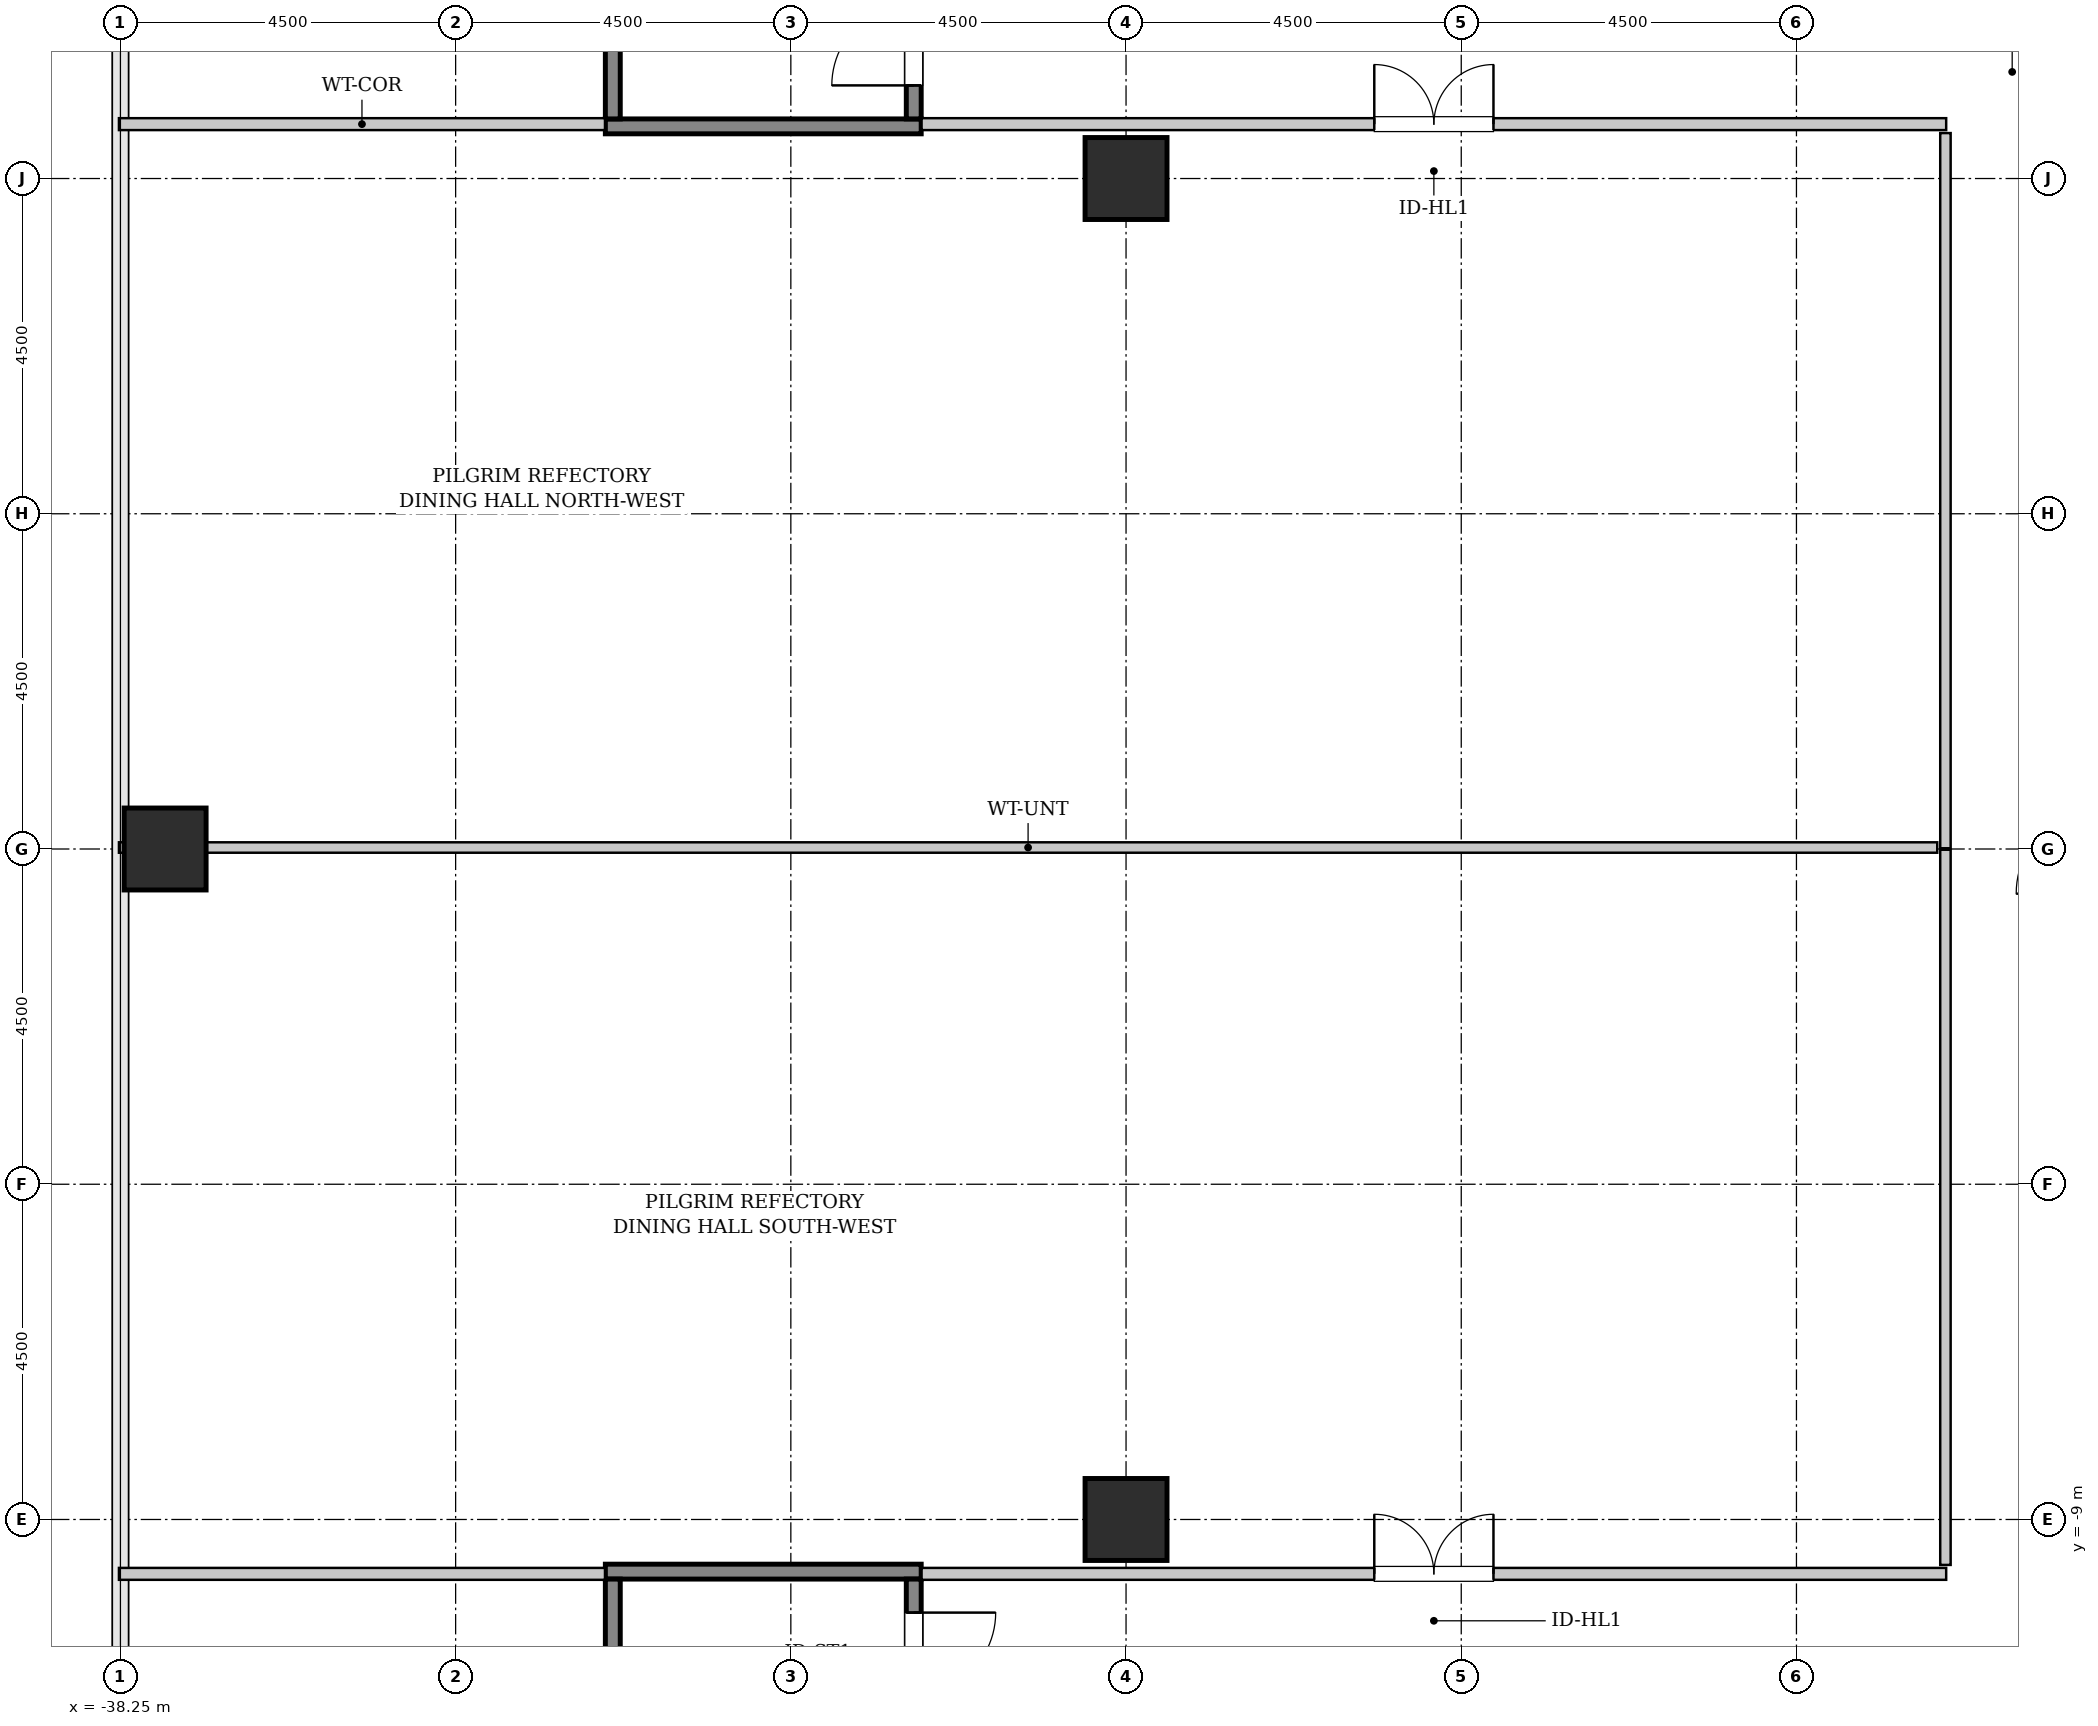
"""IFC4 building model, lengths in metres.
Left out: names, types, materials, properties, quantities, classifications, styles, units other than length and angle.
Written with IfcOpenShell. Run it as: python <this file> out.ifc"""

import sys

from ifc_helpers import new_model, si_unit, direction, frame, frame_2d, origin, origin_2d, place, context, subcontext, project, spatial, rectangle, hollow_rectangle, extrude, source, transform, mapped, element, fill, save


model = new_model("IFC4")
c1 = context("Model", 3, precision=1e-05, world=origin(), true_north=direction((0.0, 1.0)))
c2 = subcontext(c1, "Body", "Model", "MODEL_VIEW")
j1 = project(units=[si_unit("LENGTHUNIT", "METRE"), si_unit("PLANEANGLEUNIT", "RADIAN")], contexts=[c1])
p1 = place(None, origin())
s1 = spatial("IfcSite", under=j1, at=p1, CompositionType="ELEMENT")
p2 = place(p1, origin())
s2 = spatial("IfcBuilding", under=s1, at=p2, CompositionType="ELEMENT")
p3 = place(p2, frame((0.0, 0.0, 16.8)))
s3 = spatial("IfcBuildingStorey", under=s2, at=p3, CompositionType="ELEMENT", Elevation=16.8)
m1 = source(origin(), c2, "Body", "SweptSolid", [
    extrude(hollow_rectangle(XDim=1.1, YDim=1.1, WallThickness=0.055, InnerFilletRadius=0.055, OuterFilletRadius=0.11, at=origin_2d()), origin(), (0.0, 0.0, 1.0), 5.4),
])
p4 = place(p3, frame((-37.65, 0.0, 0.0), z_axis=(0.0, 0.0, 1.0), x_axis=(1.0, 0.0, 0.0)))
e1 = element("IfcColumn", 1, at=p4, inside=s3, PredefinedType="COLUMN", context=c2, shape_type="MappedRepresentation", body=[
    mapped(m1, transform((0.0, 0.0, 0.0), x_axis=(1.0, 0.0, 0.0), y_axis=(0.0, 1.0, 0.0), z_axis=(0.0, 0.0, 1.0), scale=1.0)),
])
m2 = source(origin(), c2, "Body", "SweptSolid", [
    extrude(hollow_rectangle(XDim=1.1, YDim=1.1, WallThickness=0.055, InnerFilletRadius=0.055, OuterFilletRadius=0.11, at=origin_2d()), origin(), (0.0, 0.0, 1.0), 5.4),
])
for number, where, z_axis, x_axis in (
    (2, (-24.75, -9.0, 0.0), (0.0, 0.0, 1.0), (1.0, 0.0, 0.0)),
    (3, (-24.75, 9.0, 0.0), (0.0, 0.0, 1.0), (1.0, 0.0, 0.0)),
):
    element("IfcColumn", number, at=place(p3, frame(where, z_axis=z_axis, x_axis=x_axis)), inside=s3, PredefinedType="COLUMN", context=c2, shape_type="MappedRepresentation", body=[
        mapped(m2, transform((0.0, 0.0, 0.0), x_axis=(1.0, 0.0, 0.0), y_axis=(0.0, 1.0, 0.0), z_axis=(0.0, 0.0, 1.0), scale=1.0)),
    ])
m3 = source(origin(), c2, "Body", "SweptSolid", [
    extrude(rectangle(XDim=4.24, YDim=0.2, at=frame_2d((2.12, 0.0))), origin(), (0.0, 0.0, 1.0), 5.4),
])
p5 = place(p3, frame((-27.5, 9.7, 0.0), z_axis=(0.0, 0.0, 1.0), x_axis=(-1.0, 0.0, 0.0)))
e4 = element("IfcWall", 4, at=p5, inside=s3, PredefinedType="SOLIDWALL", context=c2, shape_type="MappedRepresentation", body=[
    mapped(m3, transform((0.0, 0.0, 0.0), x_axis=(1.0, 0.0, 0.0), y_axis=(0.0, 1.0, 0.0), z_axis=(0.0, 0.0, 1.0), scale=1.0)),
])
m4 = source(origin(), c2, "Body", "SweptSolid", [
    extrude(rectangle(XDim=9.0, YDim=0.2, at=frame_2d((4.5, 0.0))), origin(), (0.0, 0.0, 1.0), 5.4),
])
p6 = place(p3, frame((-27.6, 9.8, 0.0), z_axis=(0.0, 0.0, 1.0), x_axis=(0.0, 1.0, 0.0)))
e5 = element("IfcWall", 5, at=p6, inside=s3, PredefinedType="SOLIDWALL", context=c2, shape_type="MappedRepresentation", body=[
    mapped(m4, transform((0.0, 0.0, 0.0), x_axis=(1.0, 0.0, 0.0), y_axis=(0.0, 1.0, 0.0), z_axis=(0.0, 0.0, 1.0), scale=1.0)),
])
p7 = place(p6, frame((0.45, 0.0, 0.0)))
e6 = element("IfcOpeningElement", 6, at=p7, cuts=e5, PredefinedType="OPENING", context=c2, shape_type="SweptSolid", body=[
    extrude(rectangle(XDim=1.1, YDim=2.15, at=frame_2d((0.55, 1.075))), frame((0.0, 0.11, 0.0), z_axis=(0.0, -1.0, 0.0), x_axis=(1.0, 0.0, 0.0)), (0.0, 0.0, 1.0), 0.22),
])
p8 = place(p3, frame((-31.64, 9.8, 0.0), z_axis=(0.0, 0.0, 1.0), x_axis=(0.0, 1.0, 0.0)))
e7 = element("IfcWall", 7, at=p8, inside=s3, PredefinedType="SOLIDWALL", context=c2, shape_type="MappedRepresentation", body=[
    mapped(m4, transform((0.0, 0.0, 0.0), x_axis=(1.0, 0.0, 0.0), y_axis=(0.0, 1.0, 0.0), z_axis=(0.0, 0.0, 1.0), scale=1.0)),
])
p9 = place(p3, frame((-31.74, -9.7, 0.0), z_axis=(0.0, 0.0, 1.0), x_axis=(1.0, 0.0, 0.0)))
e8 = element("IfcWall", 8, at=p9, inside=s3, PredefinedType="SOLIDWALL", context=c2, shape_type="MappedRepresentation", body=[
    mapped(m3, transform((0.0, 0.0, 0.0), x_axis=(1.0, 0.0, 0.0), y_axis=(0.0, 1.0, 0.0), z_axis=(0.0, 0.0, 1.0), scale=1.0)),
])
p10 = place(p3, frame((-31.64, -9.8, 0.0), z_axis=(0.0, 0.0, 1.0), x_axis=(0.0, -1.0, 0.0)))
e9 = element("IfcWall", 9, at=p10, inside=s3, PredefinedType="SOLIDWALL", context=c2, shape_type="MappedRepresentation", body=[
    mapped(m4, transform((0.0, 0.0, 0.0), x_axis=(1.0, 0.0, 0.0), y_axis=(0.0, 1.0, 0.0), z_axis=(0.0, 0.0, 1.0), scale=1.0)),
])
p11 = place(p3, frame((-27.6, -9.8, 0.0), z_axis=(0.0, 0.0, 1.0), x_axis=(0.0, -1.0, 0.0)))
e10 = element("IfcWall", 10, at=p11, inside=s3, PredefinedType="SOLIDWALL", context=c2, shape_type="MappedRepresentation", body=[
    mapped(m4, transform((0.0, 0.0, 0.0), x_axis=(1.0, 0.0, 0.0), y_axis=(0.0, 1.0, 0.0), z_axis=(0.0, 0.0, 1.0), scale=1.0)),
])
p12 = place(p11, frame((0.45, 0.0, 0.0)))
e11 = element("IfcOpeningElement", 11, at=p12, cuts=e10, PredefinedType="OPENING", context=c2, shape_type="SweptSolid", body=[
    extrude(rectangle(XDim=1.1, YDim=2.15, at=frame_2d((0.55, 1.075))), frame((0.0, 0.11, 0.0), z_axis=(0.0, -1.0, 0.0), x_axis=(1.0, 0.0, 0.0)), (0.0, 0.0, 1.0), 0.22),
])
m5 = source(origin(), c2, "Body", "SweptSolid", [
    extrude(rectangle(XDim=13.755, YDim=0.16, at=frame_2d((6.877, 0.0))), origin(), (0.0, 0.0, 1.0), 5.085),
])
p13 = place(p3, frame((-27.495, 9.73, 0.0), z_axis=(0.0, 0.0, 1.0), x_axis=(1.0, 0.0, 0.0)))
e12 = element("IfcWall", 12, at=p13, inside=s3, PredefinedType="PARTITIONING", context=c2, shape_type="MappedRepresentation", body=[
    mapped(m5, transform((0.0, 0.0, 0.0), x_axis=(1.0, 0.0, 0.0), y_axis=(0.0, 1.0, 0.0), z_axis=(0.0, 0.0, 1.0), scale=1.0)),
])
p14 = place(p13, frame((6.077, 0.0, 0.0)))
e13 = element("IfcOpeningElement", 13, at=p14, cuts=e12, PredefinedType="OPENING", context=c2, shape_type="SweptSolid", body=[
    extrude(rectangle(XDim=1.6, YDim=2.3, at=frame_2d((0.8, 1.15))), frame((0.0, 0.09, 0.0), z_axis=(0.0, -1.0, 0.0), x_axis=(1.0, 0.0, 0.0)), (0.0, 0.0, 1.0), 0.18),
])
m6 = source(origin(), c2, "Body", "SweptSolid", [
    extrude(rectangle(XDim=6.525, YDim=0.16, at=frame_2d((3.262, 0.0))), origin(), (0.0, 0.0, 1.0), 5.085),
])
p15 = place(p3, frame((-38.27, 9.73, 0.0), z_axis=(0.0, 0.0, 1.0), x_axis=(1.0, 0.0, 0.0)))
e14 = element("IfcWall", 14, at=p15, inside=s3, PredefinedType="PARTITIONING", context=c2, shape_type="MappedRepresentation", body=[
    mapped(m6, transform((0.0, 0.0, 0.0), x_axis=(1.0, 0.0, 0.0), y_axis=(0.0, 1.0, 0.0), z_axis=(0.0, 0.0, 1.0), scale=1.0)),
])
m7 = source(origin(), c2, "Body", "SweptSolid", [
    extrude(rectangle(XDim=9.6, YDim=0.14, at=frame_2d((4.8, 0.0))), origin(), (0.0, 0.0, 1.0), 5.085),
])
p16 = place(p3, frame((-13.75, 0.01, 0.0), z_axis=(0.0, 0.0, 1.0), x_axis=(0.0, 1.0, 0.0)))
e15 = element("IfcWall", 15, at=p16, inside=s3, PredefinedType="PARTITIONING", context=c2, shape_type="MappedRepresentation", body=[
    mapped(m7, transform((0.0, 0.0, 0.0), x_axis=(1.0, 0.0, 0.0), y_axis=(0.0, 1.0, 0.0), z_axis=(0.0, 0.0, 1.0), scale=1.0)),
])
m8 = source(origin(), c2, "Body", "SweptSolid", [
    extrude(rectangle(XDim=24.41, YDim=0.14, at=frame_2d((12.205, 0.0))), origin(), (0.0, 0.0, 1.0), 5.085),
])
p17 = place(p3, frame((-38.27, 0.02, 0.0), z_axis=(0.0, 0.0, 1.0), x_axis=(1.0, 0.0, 0.0)))
e16 = element("IfcWall", 16, at=p17, inside=s3, PredefinedType="PARTITIONING", context=c2, shape_type="MappedRepresentation", body=[
    mapped(m8, transform((0.0, 0.0, 0.0), x_axis=(1.0, 0.0, 0.0), y_axis=(0.0, 1.0, 0.0), z_axis=(0.0, 0.0, 1.0), scale=1.0)),
])
p18 = place(p3, frame((-38.27, -9.73, 0.0), z_axis=(0.0, 0.0, 1.0), x_axis=(1.0, 0.0, 0.0)))
e17 = element("IfcWall", 17, at=p18, inside=s3, PredefinedType="PARTITIONING", context=c2, shape_type="MappedRepresentation", body=[
    mapped(m6, transform((0.0, 0.0, 0.0), x_axis=(1.0, 0.0, 0.0), y_axis=(0.0, 1.0, 0.0), z_axis=(0.0, 0.0, 1.0), scale=1.0)),
])
p19 = place(p3, frame((-27.495, -9.73, 0.0), z_axis=(0.0, 0.0, 1.0), x_axis=(1.0, 0.0, 0.0)))
e18 = element("IfcWall", 18, at=p19, inside=s3, PredefinedType="PARTITIONING", context=c2, shape_type="MappedRepresentation", body=[
    mapped(m5, transform((0.0, 0.0, 0.0), x_axis=(1.0, 0.0, 0.0), y_axis=(0.0, 1.0, 0.0), z_axis=(0.0, 0.0, 1.0), scale=1.0)),
])
p20 = place(p19, frame((6.077, 0.0, 0.0)))
e19 = element("IfcOpeningElement", 19, at=p20, cuts=e18, PredefinedType="OPENING", context=c2, shape_type="SweptSolid", body=[
    extrude(rectangle(XDim=1.6, YDim=2.3, at=frame_2d((0.8, 1.15))), frame((0.0, 0.09, 0.0), z_axis=(0.0, -1.0, 0.0), x_axis=(1.0, 0.0, 0.0)), (0.0, 0.0, 1.0), 0.18),
])
p21 = place(p3, frame((-13.75, -9.61, 0.0), z_axis=(0.0, 0.0, 1.0), x_axis=(0.0, 1.0, 0.0)))
e20 = element("IfcWall", 20, at=p21, inside=s3, PredefinedType="PARTITIONING", context=c2, shape_type="MappedRepresentation", body=[
    mapped(m7, transform((0.0, 0.0, 0.0), x_axis=(1.0, 0.0, 0.0), y_axis=(0.0, 1.0, 0.0), z_axis=(0.0, 0.0, 1.0), scale=1.0)),
])
m9 = source(origin(), c2, "Body", "SweptSolid", [
    extrude(rectangle(XDim=1.1, YDim=2.15, at=frame_2d((0.55, 1.075))), frame((0.0, 0.025, 0.0), z_axis=(0.0, -1.0, 0.0), x_axis=(1.0, 0.0, 0.0)), (0.0, 0.0, 1.0), 0.05),
])
p22 = place(p7, origin())
e21 = element("IfcDoor", 21, at=p22, inside=s3, OperationType="SINGLE_SWING_LEFT", PredefinedType="DOOR", context=c2, shape_type="MappedRepresentation", body=[
    mapped(m9, transform((0.0, 0.0, 0.0), x_axis=(1.0, 0.0, 0.0), y_axis=(0.0, 1.0, 0.0), z_axis=(0.0, 0.0, 1.0), scale=1.0)),
])
fill(e6, e21)
p23 = place(p12, origin())
e22 = element("IfcDoor", 22, at=p23, inside=s3, OperationType="SINGLE_SWING_LEFT", PredefinedType="DOOR", context=c2, shape_type="MappedRepresentation", body=[
    mapped(m9, transform((0.0, 0.0, 0.0), x_axis=(1.0, 0.0, 0.0), y_axis=(0.0, 1.0, 0.0), z_axis=(0.0, 0.0, 1.0), scale=1.0)),
])
fill(e11, e22)
m10 = source(origin(), c2, "Body", "SweptSolid", [
    extrude(rectangle(XDim=1.6, YDim=2.3, at=frame_2d((0.8, 1.15))), frame((0.0, 0.025, 0.0), z_axis=(0.0, -1.0, 0.0), x_axis=(1.0, 0.0, 0.0)), (0.0, 0.0, 1.0), 0.05),
])
p24 = place(p14, origin())
e23 = element("IfcDoor", 23, at=p24, inside=s3, OperationType="DOUBLE_DOOR_SINGLE_SWING", PredefinedType="DOOR", context=c2, shape_type="MappedRepresentation", body=[
    mapped(m10, transform((0.0, 0.0, 0.0), x_axis=(1.0, 0.0, 0.0), y_axis=(0.0, 1.0, 0.0), z_axis=(0.0, 0.0, 1.0), scale=1.0)),
])
fill(e13, e23)
p25 = place(p20, origin())
e24 = element("IfcDoor", 24, at=p25, inside=s3, OperationType="DOUBLE_DOOR_SINGLE_SWING", PredefinedType="DOOR", context=c2, shape_type="MappedRepresentation", body=[
    mapped(m10, transform((0.0, 0.0, 0.0), x_axis=(1.0, 0.0, 0.0), y_axis=(0.0, 1.0, 0.0), z_axis=(0.0, 0.0, 1.0), scale=1.0)),
])
fill(e19, e24)
save(model, sys.argv[1])
